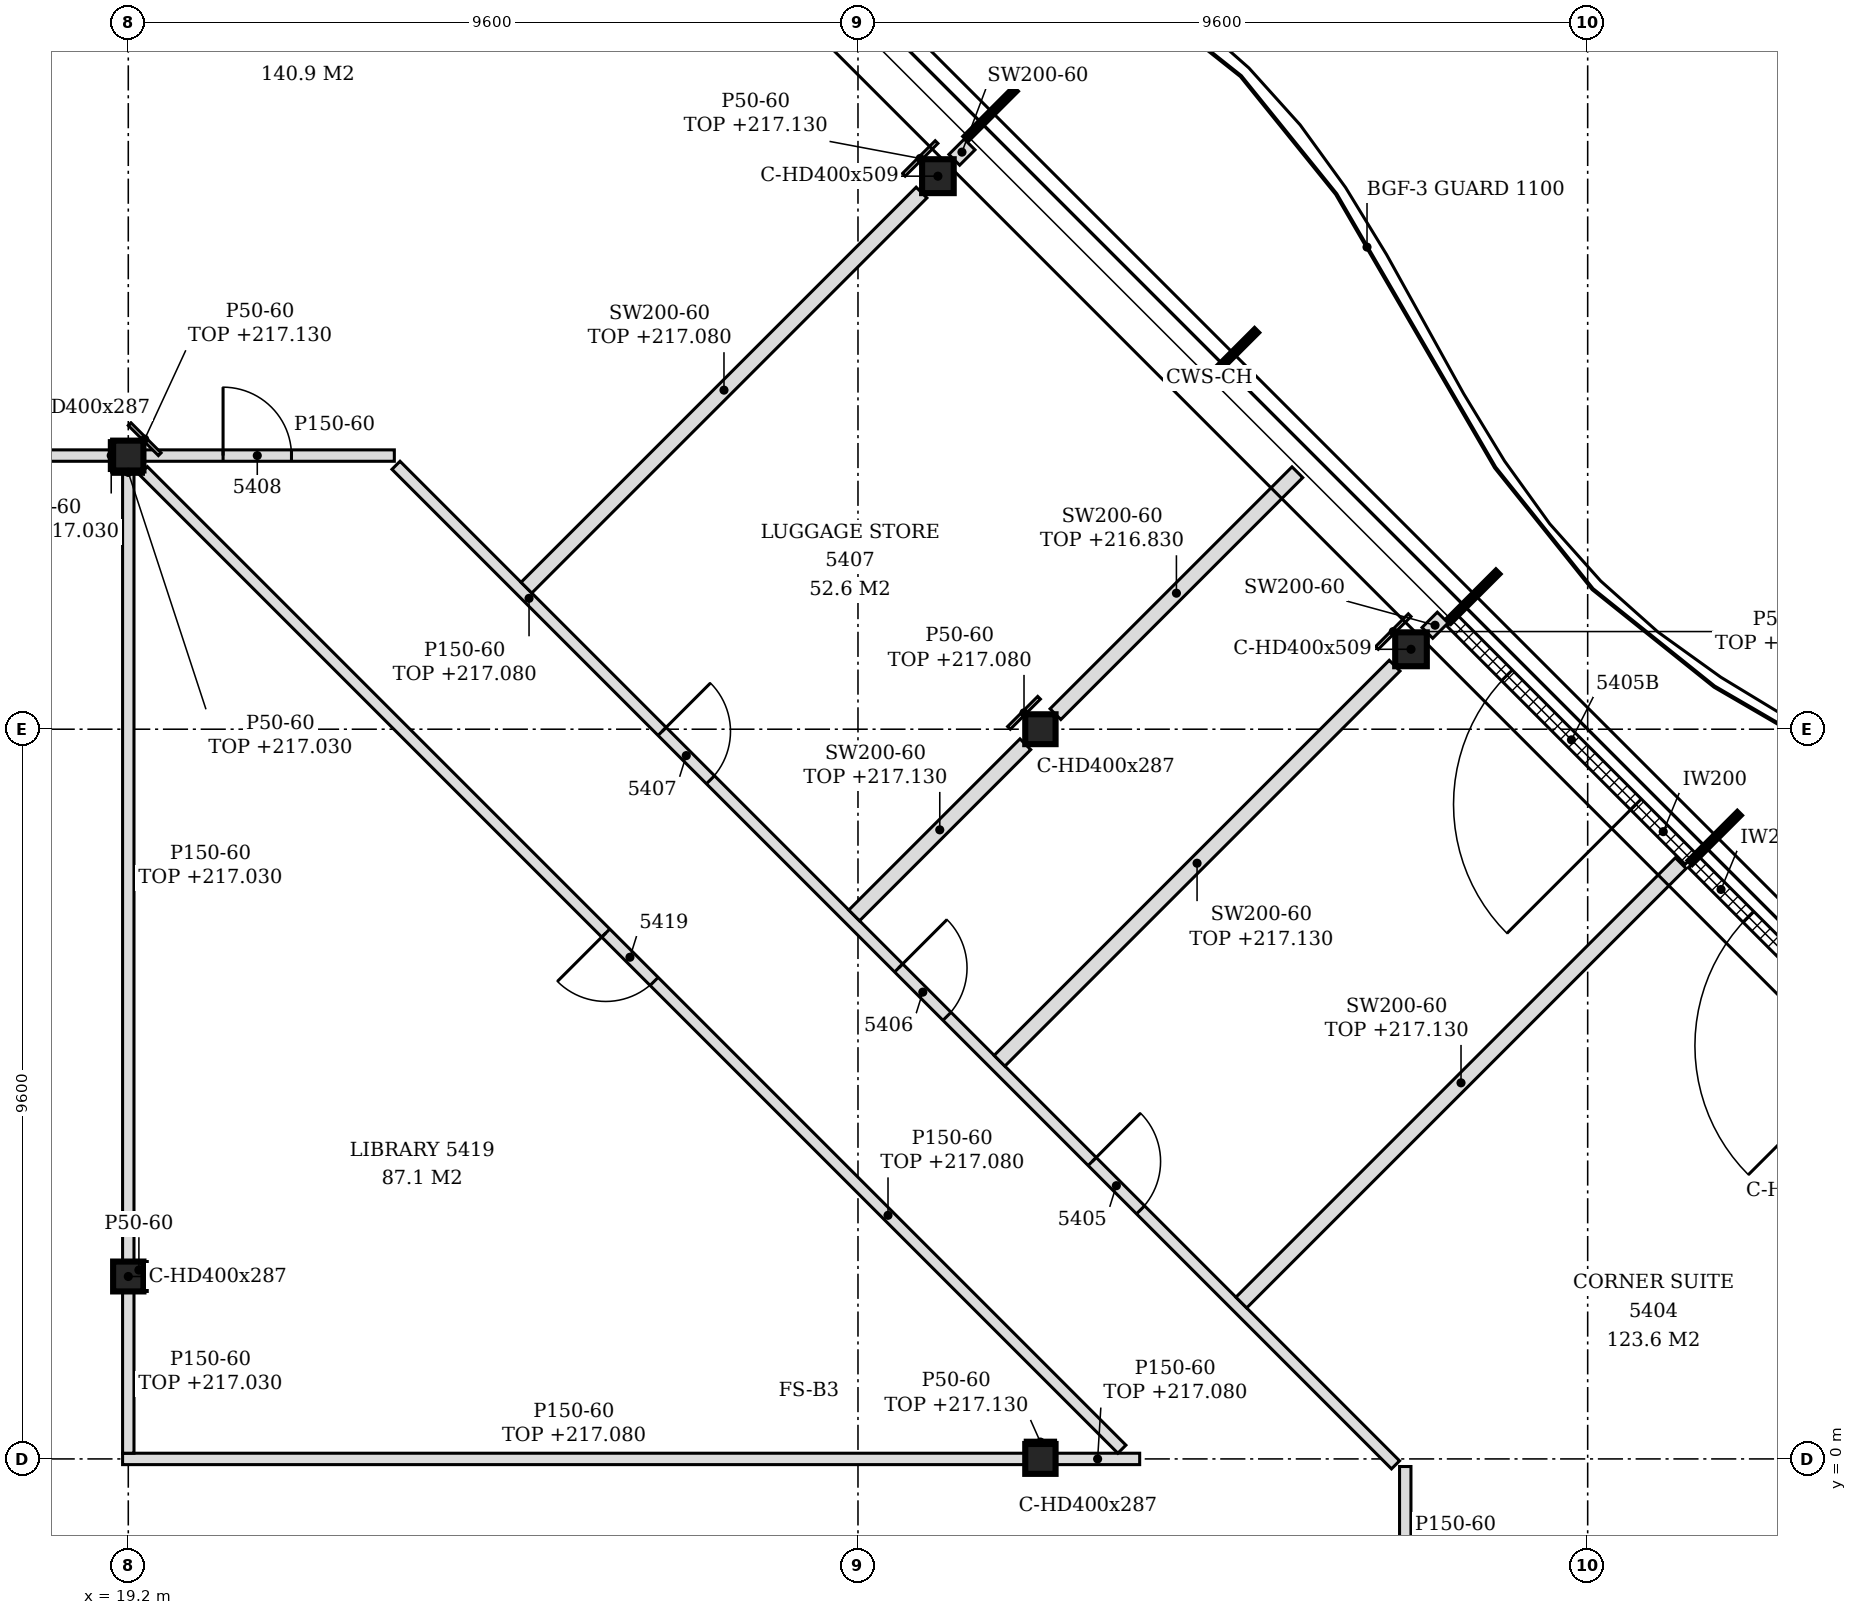
"""IFC4 building model, lengths in metres.
Left out: names, types, materials, properties, quantities, classifications, styles, units other than length and angle.
Written with IfcOpenShell. Run it as: python <this file> out.ifc"""

import sys

from ifc_helpers import new_model, si_unit, direction, frame, frame_2d, origin, origin_2d, place, context, subcontext, project, spatial, polyline, rectangle, i_section, outline, extrude, element, fill, save


model = new_model("IFC4")
c1 = context("Model", 3, precision=1e-05, world=origin(), true_north=direction((0.0, 1.0)))
c2 = subcontext(c1, "Body", "Model", "MODEL_VIEW")
j1 = project(units=[si_unit("LENGTHUNIT", "METRE"), si_unit("PLANEANGLEUNIT", "RADIAN")], contexts=[c1])
p1 = place(None, origin())
s1 = spatial("IfcSite", under=j1, at=p1, CompositionType="ELEMENT")
p2 = place(p1, origin())
s2 = spatial("IfcBuilding", under=s1, at=p2, CompositionType="ELEMENT")
p3 = place(p2, frame((0.0, 0.0, 214.2)))
s3 = spatial("IfcBuildingStorey", under=s2, at=p3, CompositionType="ELEMENT", Elevation=214.2)
for number, where, z_axis, x_axis in (
    (1, (36.076, 10.652, -0.15), (0.0, 0.0, 1.0), (1.0, 0.0, 0.0)),
    (2, (29.852, 16.876, -0.15), (0.0, 0.0, 1.0), (1.0, 0.0, 0.0)),
):
    element("IfcColumn", number, at=place(p3, frame(where, z_axis=z_axis, x_axis=x_axis)), inside=s3, PredefinedType="COLUMN", context=c2, shape_type="SweptSolid", body=[
        extrude(i_section(OverallWidth=0.416, OverallDepth=0.446, WebThickness=0.039, FlangeThickness=0.063, FilletRadius=0.015, at=origin_2d()), origin(), (0.0, 0.0, 1.0), 3.6),
    ])
for number, where, z_axis, x_axis in (
    (3, (19.2, 2.4, -0.15), (0.0, 0.0, 1.0), (1.0, 0.0, 0.0)),
    (4, (19.2, 13.2, -0.15), (0.0, 0.0, 1.0), (1.0, 0.0, 0.0)),
    (5, (31.2, 0.0, -0.15), (0.0, 0.0, 1.0), (1.0, 0.0, 0.0)),
    (6, (31.2, 9.6, -0.15), (0.0, 0.0, 1.0), (1.0, 0.0, 0.0)),
):
    element("IfcColumn", number, at=place(p3, frame(where, z_axis=z_axis, x_axis=x_axis)), inside=s3, PredefinedType="COLUMN", context=c2, shape_type="SweptSolid", body=[
        extrude(i_section(OverallWidth=0.399, OverallDepth=0.393, WebThickness=0.023, FlangeThickness=0.037, FilletRadius=0.015, at=origin_2d()), origin(), (0.0, 0.0, 1.0), 3.6),
    ])
p4 = place(p3, frame((42.922, 4.725, 0.0), z_axis=(0.0, 0.0, 1.0), x_axis=(-0.707079168996, 0.707134392299, 0.0)))
e7 = element("IfcWall", 7, at=p4, inside=s3, PredefinedType="NOTDEFINED", context=c2, shape_type="SweptSolid", body=[
    extrude(rectangle(XDim=4.421, YDim=0.2, at=frame_2d((2.21, 0.0))), origin(), (0.0, 0.0, 1.0), 3.45),
])
p5 = place(p4, frame((1.005, 0.0, 0.0)))
e8 = element("IfcOpeningElement", 8, at=p5, cuts=e7, PredefinedType="OPENING", context=c2, shape_type="SweptSolid", body=[
    extrude(rectangle(XDim=2.4, YDim=2.4, at=frame_2d((1.2, 1.2))), frame((0.0, 0.11, 0.0), z_axis=(0.0, -1.0, 0.0), x_axis=(1.0, 0.0, 0.0)), (0.0, 0.0, 1.0), 0.22),
])
p6 = place(p3, frame((39.753, 7.893, 0.0), z_axis=(0.0, 0.0, 1.0), x_axis=(-0.707106781187, 0.707106781187, 0.0)))
e9 = element("IfcWall", 9, at=p6, inside=s3, PredefinedType="NOTDEFINED", context=c2, shape_type="SweptSolid", body=[
    extrude(rectangle(XDim=4.431, YDim=0.2, at=frame_2d((2.215, 0.0))), origin(), (0.0, 0.0, 1.0), 3.45),
])
p7 = place(p6, frame((1.016, 0.0, 0.0)))
e10 = element("IfcOpeningElement", 10, at=p7, cuts=e9, PredefinedType="OPENING", context=c2, shape_type="SweptSolid", body=[
    extrude(rectangle(XDim=2.4, YDim=2.4, at=frame_2d((1.2, 1.2))), frame((0.0, 0.11, 0.0), z_axis=(0.0, -1.0, 0.0), x_axis=(1.0, 0.0, 0.0)), (0.0, 0.0, 1.0), 0.22),
])
p8 = place(p3, frame((36.0, -1.637, 0.0), z_axis=(0.0, 0.0, 1.0), x_axis=(0.0, 1.0, 0.0)))
e11 = element("IfcWall", 11, at=p8, inside=s3, PredefinedType="PARTITIONING", context=c2, shape_type="SweptSolid", body=[
    extrude(outline(polyline([(0.0, 0.0), (1.537, 0.0), (1.537, 2.88), (1.532, 2.88), (1.53, 3.45), (0.0, 3.45), (0.0, 0.0)])), frame((0.0, 0.075, 0.0), z_axis=(0.0, -1.0, 0.0), x_axis=(1.0, 0.0, 0.0)), (0.0, 0.0, 1.0), 0.15),
])
p9 = place(p3, frame((35.872, -0.078, 0.0), z_axis=(0.0, 0.0, 1.0), x_axis=(-0.707113345155, 0.707100217157, 0.0)))
e12 = element("IfcWall", 12, at=p9, inside=s3, PredefinedType="PARTITIONING", context=c2, shape_type="SweptSolid", body=[
    extrude(rectangle(XDim=18.597, YDim=0.15, at=frame_2d((9.298, 0.0))), origin(), (0.0, 0.0, 1.0), 2.88),
])
p10 = place(p9, frame((4.744, 0.0, 0.0)))
e13 = element("IfcOpeningElement", 13, at=p10, cuts=e12, PredefinedType="OPENING", context=c2, shape_type="SweptSolid", body=[
    extrude(rectangle(XDim=0.9, YDim=2.1, at=frame_2d((0.45, 1.05))), frame((0.0, 0.085, 0.0), z_axis=(0.0, -1.0, 0.0), x_axis=(1.0, 0.0, 0.0)), (0.0, 0.0, 1.0), 0.17),
])
p11 = place(p9, frame((8.345, 0.0, 0.0)))
e14 = element("IfcOpeningElement", 14, at=p11, cuts=e12, PredefinedType="OPENING", context=c2, shape_type="SweptSolid", body=[
    extrude(rectangle(XDim=0.9, YDim=2.1, at=frame_2d((0.45, 1.05))), frame((0.0, 0.085, 0.0), z_axis=(0.0, -1.0, 0.0), x_axis=(1.0, 0.0, 0.0)), (0.0, 0.0, 1.0), 0.17),
])
p12 = place(p9, frame((12.746, 0.0, 0.0)))
e15 = element("IfcOpeningElement", 15, at=p12, cuts=e12, PredefinedType="OPENING", context=c2, shape_type="SweptSolid", body=[
    extrude(rectangle(XDim=0.9, YDim=2.1, at=frame_2d((0.45, 1.05))), frame((0.0, 0.085, 0.0), z_axis=(0.0, -1.0, 0.0), x_axis=(1.0, 0.0, 0.0)), (0.0, 0.0, 1.0), 0.17),
])
p13 = place(p3, frame((19.125, 0.0, 0.0), z_axis=(0.0, 0.0, 1.0), x_axis=(1.0, 0.0, 0.0)))
e16 = element("IfcWall", 16, at=p13, inside=s3, PredefinedType="PARTITIONING", context=c2, shape_type="SweptSolid", body=[
    extrude(outline(polyline([(0.0, 0.0), (11.875, 0.0), (11.875, 2.88), (0.225, 2.88), (0.223, 2.83), (0.0, 2.83), (0.0, 0.0)])), frame((0.0, 0.075, 0.0), z_axis=(0.0, -1.0, 0.0), x_axis=(1.0, 0.0, 0.0)), (0.0, 0.0, 1.0), 0.15),
])
p14 = place(p3, frame((31.399, 0.0, 0.0), z_axis=(0.0, 0.0, 1.0), x_axis=(1.0, 0.0, 0.0)))
e17 = element("IfcWall", 17, at=p14, inside=s3, PredefinedType="PARTITIONING", context=c2, shape_type="SweptSolid", body=[
    extrude(rectangle(XDim=1.107, YDim=0.15, at=frame_2d((0.553, 0.0))), origin(), (0.0, 0.0, 1.0), 2.88),
])
p15 = place(p3, frame((19.2, 0.075, 0.0), z_axis=(0.0, 0.0, 1.0), x_axis=(0.0, 1.0, 0.0)))
e18 = element("IfcWall", 18, at=p15, inside=s3, PredefinedType="PARTITIONING", context=c2, shape_type="SweptSolid", body=[
    extrude(rectangle(XDim=2.129, YDim=0.15, at=frame_2d((1.064, 0.0))), origin(), (0.0, 0.0, 1.0), 2.83),
])
p16 = place(p3, frame((32.272, 0.128, 0.0), z_axis=(0.0, 0.0, 1.0), x_axis=(-0.707106781187, 0.707106781187, 0.0)))
e19 = element("IfcWall", 19, at=p16, inside=s3, PredefinedType="PARTITIONING", context=c2, shape_type="SweptSolid", body=[
    extrude(rectangle(XDim=18.207, YDim=0.15, at=frame_2d((9.103, 0.0))), origin(), (0.0, 0.0, 1.0), 2.88),
])
p17 = place(p16, frame((8.703, 0.0, 0.0)))
e20 = element("IfcOpeningElement", 20, at=p17, cuts=e19, PredefinedType="OPENING", context=c2, shape_type="SweptSolid", body=[
    extrude(rectangle(XDim=0.9, YDim=2.1, at=frame_2d((0.45, 1.05))), frame((0.0, 0.085, 0.0), z_axis=(0.0, -1.0, 0.0), x_axis=(1.0, 0.0, 0.0)), (0.0, 0.0, 1.0), 0.17),
])
p18 = place(p3, frame((33.843, 2.057, 0.0), z_axis=(0.0, 0.0, 1.0), x_axis=(0.70709185088, 0.707121711178, 0.0)))
e21 = element("IfcWall", 21, at=p18, inside=s3, PredefinedType="PARTITIONING", context=c2, shape_type="SweptSolid", body=[
    extrude(rectangle(XDim=8.176, YDim=0.2, at=frame_2d((4.088, 0.0))), origin(), (0.0, 0.0, 1.0), 2.93),
])
p19 = place(p3, frame((19.2, 2.596, 0.0), z_axis=(0.0, 0.0, 1.0), x_axis=(0.0, 1.0, 0.0)))
e22 = element("IfcWall", 22, at=p19, inside=s3, PredefinedType="PARTITIONING", context=c2, shape_type="SweptSolid", body=[
    extrude(rectangle(XDim=10.407, YDim=0.15, at=frame_2d((5.204, 0.0))), origin(), (0.0, 0.0, 1.0), 2.83),
])
p20 = place(p3, frame((30.662, 5.238, 0.0), z_axis=(0.0, 0.0, 1.0), x_axis=(0.707106781187, 0.707106781187, 0.0)))
e23 = element("IfcWall", 23, at=p20, inside=s3, PredefinedType="PARTITIONING", context=c2, shape_type="SweptSolid", body=[
    extrude(rectangle(XDim=7.351, YDim=0.2, at=frame_2d((3.676, 0.0))), origin(), (0.0, 0.0, 1.0), 2.93),
])
p21 = place(p3, frame((28.75, 7.15, 0.0), z_axis=(0.0, 0.0, 1.0), x_axis=(0.7070684525, 0.707145107796, 0.0)))
e24 = element("IfcWall", 24, at=p21, inside=s3, PredefinedType="PARTITIONING", context=c2, shape_type="SweptSolid", body=[
    extrude(rectangle(XDim=3.185, YDim=0.2, at=frame_2d((1.592, 0.0))), origin(), (0.0, 0.0, 1.0), 2.93),
])
p22 = place(p3, frame((31.398, 9.798, 0.0), z_axis=(0.0, 0.0, 1.0), x_axis=(0.707133900936, 0.707079660397, 0.0)))
e25 = element("IfcWall", 25, at=p22, inside=s3, PredefinedType="PARTITIONING", context=c2, shape_type="SweptSolid", body=[
    extrude(rectangle(XDim=4.501, YDim=0.2, at=frame_2d((2.25, 0.0))), origin(), (0.0, 0.0, 1.0), 2.63),
])
p23 = place(p3, frame((36.291, 10.867, 0.0), z_axis=(0.0, 0.0, 1.0), x_axis=(0.707534423513, 0.706678880075, 0.0)))
e26 = element("IfcWall", 26, at=p23, inside=s3, PredefinedType="PARTITIONING", context=c2, shape_type="SweptSolid", body=[
    extrude(rectangle(XDim=0.285, YDim=0.2, at=frame_2d((0.143, 0.0))), origin(), (0.0, 0.0, 1.0), 3.45),
])
p24 = place(p3, frame((24.438, 11.462, 0.0), z_axis=(0.0, 0.0, 1.0), x_axis=(0.707090175614, 0.707123386369, 0.0)))
e27 = element("IfcWall", 27, at=p24, inside=s3, PredefinedType="PARTITIONING", context=c2, shape_type="SweptSolid", body=[
    extrude(rectangle(XDim=7.351, YDim=0.2, at=frame_2d((3.676, 0.0))), origin(), (0.0, 0.0, 1.0), 2.88),
])
p25 = place(p3, frame((7.399, 13.2, 0.0), z_axis=(0.0, 0.0, 1.0), x_axis=(1.0, 0.0, 0.0)))
e28 = element("IfcWall", 28, at=p25, inside=s3, PredefinedType="PARTITIONING", context=c2, shape_type="SweptSolid", body=[
    extrude(rectangle(XDim=11.601, YDim=0.15, at=frame_2d((5.801, 0.0))), origin(), (0.0, 0.0, 1.0), 2.83),
])
p26 = place(p3, frame((19.399, 13.2, 0.0), z_axis=(0.0, 0.0, 1.0), x_axis=(1.0, 0.0, 0.0)))
e29 = element("IfcWall", 29, at=p26, inside=s3, PredefinedType="PARTITIONING", context=c2, shape_type="SweptSolid", body=[
    extrude(rectangle(XDim=3.301, YDim=0.15, at=frame_2d((1.65, 0.0))), origin(), (0.0, 0.0, 1.0), 3.45),
])
p27 = place(p26, frame((1.048, 0.0, 0.0)))
e30 = element("IfcOpeningElement", 30, at=p27, cuts=e29, PredefinedType="OPENING", context=c2, shape_type="SweptSolid", body=[
    extrude(rectangle(XDim=0.9, YDim=2.1, at=frame_2d((0.45, 1.05))), frame((0.0, 0.085, 0.0), z_axis=(0.0, -1.0, 0.0), x_axis=(1.0, 0.0, 0.0)), (0.0, 0.0, 1.0), 0.17),
])
p28 = place(p3, frame((30.067, 17.091, 0.0), z_axis=(0.0, 0.0, 1.0), x_axis=(0.707106781187, 0.707106781187, 0.0)))
e31 = element("IfcWall", 31, at=p28, inside=s3, PredefinedType="PARTITIONING", context=c2, shape_type="SweptSolid", body=[
    extrude(rectangle(XDim=0.285, YDim=0.2, at=frame_2d((0.143, 0.0))), origin(), (0.0, 0.0, 1.0), 3.45),
])
p29 = place(p3, frame((31.0, 0.221, 0.0), z_axis=(0.0, 0.0, 1.0), x_axis=(1.0, 0.0, 0.0)))
e32 = element("IfcWall", 32, at=p29, inside=s3, PredefinedType="PARTITIONING", context=c2, shape_type="SweptSolid", body=[
    extrude(rectangle(XDim=0.399, YDim=0.05, at=frame_2d((0.199, 0.0))), origin(), (0.0, 0.0, 1.0), 2.93),
])
p30 = place(p3, frame((19.425, 2.204, 0.0), z_axis=(0.0, 0.0, 1.0), x_axis=(0.0, 1.0, 0.0)))
e33 = element("IfcWall", 33, at=p30, inside=s3, PredefinedType="PARTITIONING", context=c2, shape_type="SweptSolid", body=[
    extrude(rectangle(XDim=0.393, YDim=0.05, at=frame_2d((0.196, 0.0))), origin(), (0.0, 0.0, 1.0), 3.45),
])
p31 = place(p3, frame((18.976, 13.003, 0.0), z_axis=(0.0, 0.0, 1.0), x_axis=(0.0, 1.0, 0.0)))
e34 = element("IfcWall", 34, at=p31, inside=s3, PredefinedType="PARTITIONING", context=c2, shape_type="SweptSolid", body=[
    extrude(rectangle(XDim=0.393, YDim=0.05, at=frame_2d((0.197, 0.0))), origin(), (0.0, 0.0, 1.0), 2.83),
])
p32 = place(p3, frame((19.614, 13.218, 0.0), z_axis=(0.0, 0.0, 1.0), x_axis=(-0.707106781187, 0.707106781187, 0.0)))
e35 = element("IfcWall", 35, at=p32, inside=s3, PredefinedType="PARTITIONING", context=c2, shape_type="SweptSolid", body=[
    extrude(rectangle(XDim=0.56, YDim=0.05, at=frame_2d((0.28, 0.0))), origin(), (0.0, 0.0, 1.0), 2.93),
])
p33 = place(p3, frame((35.627, 10.669, 0.0), z_axis=(0.0, 0.0, 1.0), x_axis=(0.707307009627, 0.706906496032, 0.0)))
e36 = element("IfcWall", 36, at=p33, inside=s3, PredefinedType="PARTITIONING", context=c2, shape_type="SweptSolid", body=[
    extrude(rectangle(XDim=0.61, YDim=0.05, at=frame_2d((0.305, 0.0))), origin(), (0.0, 0.0, 1.0), 2.63),
])
p34 = place(p3, frame((30.786, 9.618, 0.0), z_axis=(0.0, 0.0, 1.0), x_axis=(0.707106781187, 0.707106781187, 0.0)))
e37 = element("IfcWall", 37, at=p34, inside=s3, PredefinedType="PARTITIONING", context=c2, shape_type="SweptSolid", body=[
    extrude(rectangle(XDim=0.56, YDim=0.05, at=frame_2d((0.28, 0.0))), origin(), (0.0, 0.0, 1.0), 2.88),
])
p35 = place(p3, frame((29.403, 16.893, 0.0), z_axis=(0.0, 0.0, 1.0), x_axis=(0.706906496032, 0.707307009627, 0.0)))
e38 = element("IfcWall", 38, at=p35, inside=s3, PredefinedType="PARTITIONING", context=c2, shape_type="SweptSolid", body=[
    extrude(rectangle(XDim=0.61, YDim=0.05, at=frame_2d((0.305, 0.0))), origin(), (0.0, 0.0, 1.0), 2.93),
])
p36 = place(p3, frame((19.0, 12.979, 0.0), z_axis=(0.0, 0.0, 1.0), x_axis=(1.0, 0.0, 0.0)))
e39 = element("IfcWall", 39, at=p36, inside=s3, PredefinedType="PARTITIONING", context=c2, shape_type="SweptSolid", body=[
    extrude(rectangle(XDim=0.399, YDim=0.05, at=frame_2d((0.199, 0.0))), origin(), (0.0, 0.0, 1.0), 2.83),
])
p37 = place(p5, origin())
e40 = element("IfcDoor", 40, at=p37, inside=s3, OperationType="SINGLE_SWING_LEFT", PredefinedType="DOOR", context=c2, shape_type="SweptSolid", body=[
    extrude(rectangle(XDim=2.4, YDim=2.4, at=frame_2d((1.2, 1.2))), frame((0.0, 0.025, 0.0), z_axis=(0.0, -1.0, 0.0), x_axis=(1.0, 0.0, 0.0)), (0.0, 0.0, 1.0), 0.05),
])
fill(e8, e40)
p38 = place(p7, origin())
e41 = element("IfcDoor", 41, at=p38, inside=s3, OperationType="SINGLE_SWING_LEFT", PredefinedType="DOOR", context=c2, shape_type="SweptSolid", body=[
    extrude(rectangle(XDim=2.4, YDim=2.4, at=frame_2d((1.2, 1.2))), frame((0.0, 0.025, 0.0), z_axis=(0.0, -1.0, 0.0), x_axis=(1.0, 0.0, 0.0)), (0.0, 0.0, 1.0), 0.05),
])
fill(e10, e41)
p39 = place(p10, frame((0.9, 0.0, 0.0), z_axis=(0.0, 0.0, 1.0), x_axis=(-1.0, 0.0, 0.0)))
e42 = element("IfcDoor", 42, at=p39, inside=s3, OperationType="SINGLE_SWING_LEFT", PredefinedType="DOOR", context=c2, shape_type="SweptSolid", body=[
    extrude(rectangle(XDim=0.9, YDim=2.1, at=frame_2d((0.45, 1.05))), frame((0.0, 0.025, 0.0), z_axis=(0.0, -1.0, 0.0), x_axis=(1.0, 0.0, 0.0)), (0.0, 0.0, 1.0), 0.05),
])
fill(e13, e42)
p40 = place(p11, frame((0.9, 0.0, 0.0), z_axis=(0.0, 0.0, 1.0), x_axis=(-1.0, 0.0, 0.0)))
e43 = element("IfcDoor", 43, at=p40, inside=s3, OperationType="SINGLE_SWING_LEFT", PredefinedType="DOOR", context=c2, shape_type="SweptSolid", body=[
    extrude(rectangle(XDim=0.9, YDim=2.1, at=frame_2d((0.45, 1.05))), frame((0.0, 0.025, 0.0), z_axis=(0.0, -1.0, 0.0), x_axis=(1.0, 0.0, 0.0)), (0.0, 0.0, 1.0), 0.05),
])
fill(e14, e43)
p41 = place(p12, frame((0.9, 0.0, 0.0), z_axis=(0.0, 0.0, 1.0), x_axis=(-1.0, 0.0, 0.0)))
e44 = element("IfcDoor", 44, at=p41, inside=s3, OperationType="SINGLE_SWING_LEFT", PredefinedType="DOOR", context=c2, shape_type="SweptSolid", body=[
    extrude(rectangle(XDim=0.9, YDim=2.1, at=frame_2d((0.45, 1.05))), frame((0.0, 0.025, 0.0), z_axis=(0.0, -1.0, 0.0), x_axis=(1.0, 0.0, 0.0)), (0.0, 0.0, 1.0), 0.05),
])
fill(e15, e44)
p42 = place(p27, origin())
e45 = element("IfcDoor", 45, at=p42, inside=s3, OperationType="SINGLE_SWING_LEFT", PredefinedType="DOOR", context=c2, shape_type="SweptSolid", body=[
    extrude(rectangle(XDim=0.9, YDim=2.1, at=frame_2d((0.45, 1.05))), frame((0.0, 0.025, 0.0), z_axis=(0.0, -1.0, 0.0), x_axis=(1.0, 0.0, 0.0)), (0.0, 0.0, 1.0), 0.05),
])
fill(e30, e45)
p43 = place(p17, origin())
e46 = element("IfcDoor", 46, at=p43, inside=s3, OperationType="SINGLE_SWING_RIGHT", PredefinedType="DOOR", context=c2, shape_type="SweptSolid", body=[
    extrude(rectangle(XDim=0.9, YDim=2.1, at=frame_2d((0.45, 1.05))), frame((0.0, 0.025, 0.0), z_axis=(0.0, -1.0, 0.0), x_axis=(1.0, 0.0, 0.0)), (0.0, 0.0, 1.0), 0.05),
])
fill(e20, e46)
save(model, sys.argv[1])
